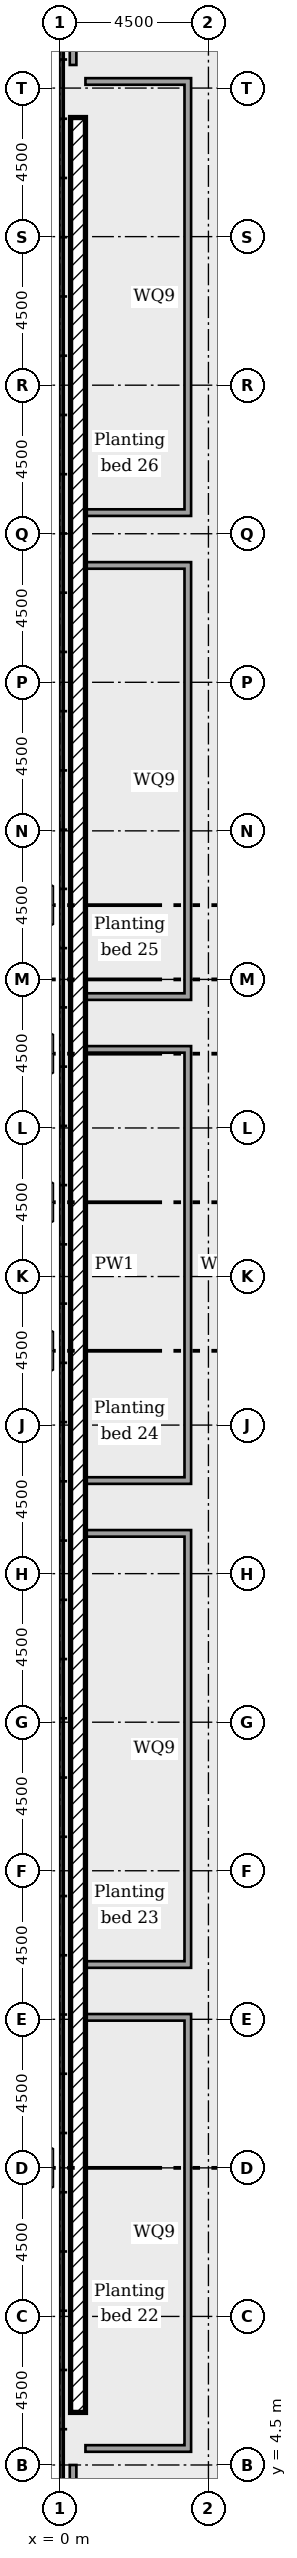
"""IFC4 building model, lengths in metres.
Left out: names, types, materials, properties, quantities, classifications, styles, units other than length and angle.
Written with IfcOpenShell. Run it as: python <this file> out.ifc"""

import sys

from ifc_helpers import new_model, si_unit, direction, frame, frame_2d, origin, place, context, subcontext, project, spatial, rectangle, extrude, element, save


model = new_model("IFC4")
c1 = context("Model", 3, precision=1e-05, world=origin(), true_north=direction((0.0, 1.0)))
c2 = subcontext(c1, "Body", "Model", "MODEL_VIEW")
j1 = project(units=[si_unit("LENGTHUNIT", "METRE"), si_unit("PLANEANGLEUNIT", "RADIAN")], contexts=[c1])
p1 = place(None, origin())
s1 = spatial("IfcSite", under=j1, at=p1, CompositionType="ELEMENT")
p2 = place(p1, origin())
s2 = spatial("IfcBuilding", under=s1, at=p2, CompositionType="ELEMENT")
p3 = place(p2, frame((0.0, 0.0, 6.0)))
s3 = spatial("IfcBuildingStorey", under=s2, at=p3, CompositionType="ELEMENT", Elevation=6.0)
p4 = place(p3, frame((0.55, 75.607, 0.0), z_axis=(0.0, 0.0, 1.0), x_axis=(0.0, -1.0, 0.0)))
e1 = element("IfcWall", 1, at=p4, inside=s3, PredefinedType="SOLIDWALL", context=c2, shape_type="SweptSolid", body=[
    extrude(rectangle(XDim=69.515, YDim=0.45, at=frame_2d((34.757, 0.0))), origin(), (0.0, 0.0, 1.0), 0.6),
])
p5 = place(p3, frame((3.875, 4.9, 0.0), z_axis=(0.0, 0.0, 1.0), x_axis=(0.0, 1.0, 0.0)))
e2 = element("IfcWall", 2, at=p5, inside=s3, PredefinedType="SOLIDWALL", context=c2, shape_type="SweptSolid", body=[
    extrude(rectangle(XDim=13.26, YDim=0.2, at=frame_2d((6.63, 0.0))), origin(), (0.0, 0.0, 1.0), 0.45),
])
for number, where in (
    (3, (0.775, 18.06, 0.0)),
    (4, (0.775, 5.0, 0.0)),
):
    element("IfcWall", number, at=place(p3, frame(where)), inside=s3, PredefinedType="SOLIDWALL", context=c2, shape_type="SweptSolid", body=[
        extrude(rectangle(XDim=3.0, YDim=0.2, at=frame_2d((1.5, 0.0))), origin(), (0.0, 0.0, 1.0), 0.45),
    ])
p6 = place(p3, frame((3.875, 19.56, 0.0), z_axis=(0.0, 0.0, 1.0), x_axis=(0.0, 1.0, 0.0)))
e5 = element("IfcWall", 5, at=p6, inside=s3, PredefinedType="SOLIDWALL", context=c2, shape_type="SweptSolid", body=[
    extrude(rectangle(XDim=13.26, YDim=0.2, at=frame_2d((6.63, 0.0))), origin(), (0.0, 0.0, 1.0), 0.45),
])
for number, where in (
    (6, (0.775, 32.72, 0.0)),
    (7, (0.775, 19.66, 0.0)),
):
    element("IfcWall", number, at=place(p3, frame(where)), inside=s3, PredefinedType="SOLIDWALL", context=c2, shape_type="SweptSolid", body=[
        extrude(rectangle(XDim=3.0, YDim=0.2, at=frame_2d((1.5, 0.0))), origin(), (0.0, 0.0, 1.0), 0.45),
    ])
p7 = place(p3, frame((3.875, 34.22, 0.0), z_axis=(0.0, 0.0, 1.0), x_axis=(0.0, 1.0, 0.0)))
e8 = element("IfcWall", 8, at=p7, inside=s3, PredefinedType="SOLIDWALL", context=c2, shape_type="SweptSolid", body=[
    extrude(rectangle(XDim=13.26, YDim=0.2, at=frame_2d((6.63, 0.0))), origin(), (0.0, 0.0, 1.0), 0.45),
])
for number, where in (
    (9, (0.775, 47.38, 0.0)),
    (10, (0.775, 34.32, 0.0)),
):
    element("IfcWall", number, at=place(p3, frame(where)), inside=s3, PredefinedType="SOLIDWALL", context=c2, shape_type="SweptSolid", body=[
        extrude(rectangle(XDim=3.0, YDim=0.2, at=frame_2d((1.5, 0.0))), origin(), (0.0, 0.0, 1.0), 0.45),
    ])
p8 = place(p3, frame((3.875, 48.88, 0.0), z_axis=(0.0, 0.0, 1.0), x_axis=(0.0, 1.0, 0.0)))
e11 = element("IfcWall", 11, at=p8, inside=s3, PredefinedType="SOLIDWALL", context=c2, shape_type="SweptSolid", body=[
    extrude(rectangle(XDim=13.26, YDim=0.2, at=frame_2d((6.63, 0.0))), origin(), (0.0, 0.0, 1.0), 0.45),
])
for number, where in (
    (12, (0.775, 62.04, 0.0)),
    (13, (0.775, 48.98, 0.0)),
):
    element("IfcWall", number, at=place(p3, frame(where)), inside=s3, PredefinedType="SOLIDWALL", context=c2, shape_type="SweptSolid", body=[
        extrude(rectangle(XDim=3.0, YDim=0.2, at=frame_2d((1.5, 0.0))), origin(), (0.0, 0.0, 1.0), 0.45),
    ])
p9 = place(p3, frame((3.875, 63.54, 0.0), z_axis=(0.0, 0.0, 1.0), x_axis=(0.0, 1.0, 0.0)))
e14 = element("IfcWall", 14, at=p9, inside=s3, PredefinedType="SOLIDWALL", context=c2, shape_type="SweptSolid", body=[
    extrude(rectangle(XDim=13.26, YDim=0.2, at=frame_2d((6.63, 0.0))), origin(), (0.0, 0.0, 1.0), 0.45),
])
for number, where in (
    (15, (0.775, 76.7, 0.0)),
    (16, (0.775, 63.64, 0.0)),
):
    element("IfcWall", number, at=place(p3, frame(where)), inside=s3, PredefinedType="SOLIDWALL", context=c2, shape_type="SweptSolid", body=[
        extrude(rectangle(XDim=3.0, YDim=0.2, at=frame_2d((1.5, 0.0))), origin(), (0.0, 0.0, 1.0), 0.45),
    ])
p10 = place(p3, frame((0.4, 77.2, 0.0), z_axis=(0.0, 0.0, 1.0), x_axis=(0.0, 1.0, 0.0)))
e17 = element("IfcWall", 17, at=p10, inside=s3, PredefinedType="SOLIDWALL", context=c2, shape_type="SweptSolid", body=[
    extrude(rectangle(XDim=3.8, YDim=0.2, at=frame_2d((1.9, 0.0))), origin(), (0.0, 0.0, 1.0), 2.3),
])
p11 = place(p10, frame((0.6, 0.0, 0.0)))
e18 = element("IfcOpeningElement", 18, at=p11, cuts=e17, PredefinedType="OPENING", context=c2, shape_type="SweptSolid", body=[
    extrude(rectangle(XDim=2.6, YDim=2.1, at=frame_2d((1.3, 1.05))), frame((0.0, 0.11, 0.0), z_axis=(0.0, -1.0, 0.0), x_axis=(1.0, 0.0, 0.0)), (0.0, 0.0, 1.0), 0.22),
])
p12 = place(p3, frame((0.4, 0.7, 0.0), z_axis=(0.0, 0.0, 1.0), x_axis=(0.0, 1.0, 0.0)))
e19 = element("IfcWall", 19, at=p12, inside=s3, PredefinedType="SOLIDWALL", context=c2, shape_type="SweptSolid", body=[
    extrude(rectangle(XDim=3.8, YDim=0.2, at=frame_2d((1.9, 0.0))), origin(), (0.0, 0.0, 1.0), 2.3),
])
p13 = place(p12, frame((0.6, 0.0, 0.0)))
e20 = element("IfcOpeningElement", 20, at=p13, cuts=e19, PredefinedType="OPENING", context=c2, shape_type="SweptSolid", body=[
    extrude(rectangle(XDim=2.6, YDim=2.1, at=frame_2d((1.3, 1.05))), frame((0.0, 0.11, 0.0), z_axis=(0.0, -1.0, 0.0), x_axis=(1.0, 0.0, 0.0)), (0.0, 0.0, 1.0), 0.22),
])
save(model, sys.argv[1])
